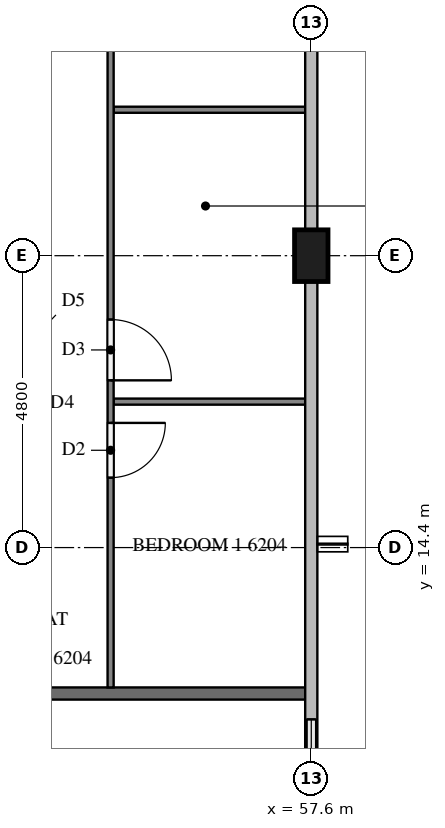
"""IFC4 building model, lengths in metres.
Left out: names, types, materials, properties, quantities, classifications, styles, units other than length and angle.
Written with IfcOpenShell. Run it as: python <this file> out.ifc"""

import sys

from ifc_helpers import new_model, si_unit, direction, frame, frame_2d, origin, origin_2d, place, context, subcontext, project, spatial, rectangle, extrude, element, fill, save


model = new_model("IFC4")
c1 = context("Model", 3, precision=1e-05, world=origin(), true_north=direction((0.0, 1.0)))
c2 = subcontext(c1, "Body", "Model", "MODEL_VIEW")
j1 = project(units=[si_unit("LENGTHUNIT", "METRE"), si_unit("PLANEANGLEUNIT", "RADIAN")], contexts=[c1])
p1 = place(None, origin())
s1 = spatial("IfcSite", under=j1, at=p1, CompositionType="ELEMENT")
p2 = place(p1, origin())
s2 = spatial("IfcBuilding", under=s1, at=p2, CompositionType="ELEMENT")
p3 = place(p2, frame((0.0, 0.0, 238.7)))
s3 = spatial("IfcBuildingStorey", under=s2, at=p3, CompositionType="ELEMENT", Elevation=238.7)
p4 = place(p3, frame((57.6, 19.2, 0.0), z_axis=(0.0, 0.0, 1.0), x_axis=(0.0, 1.0, 0.0)))
e1 = element("IfcColumn", 1, at=p4, inside=s3, PredefinedType="COLUMN", context=c2, shape_type="SweptSolid", body=[
    extrude(rectangle(XDim=0.85, YDim=0.55, at=origin_2d()), origin(), (0.0, 0.0, 1.0), 3.2),
])
p5 = place(p3, frame((57.6, 9.95, 0.0), z_axis=(0.0, 0.0, 1.0), x_axis=(0.0, 1.0, 0.0)))
e2 = element("IfcWall", 2, at=p5, inside=s3, PredefinedType="SOLIDWALL", context=c2, shape_type="SweptSolid", body=[
    extrude(rectangle(XDim=2.05, YDim=0.15, at=frame_2d((1.025, 0.0))), origin(), (0.0, 0.0, 1.0), 3.2),
])
p6 = place(p5, frame((0.425, 0.0, 0.9)))
e3 = element("IfcOpeningElement", 3, at=p6, cuts=e2, PredefinedType="OPENING", context=c2, shape_type="SweptSolid", body=[
    extrude(rectangle(XDim=1.2, YDim=1.4, at=frame_2d((0.6, 0.7))), frame((0.0, 0.085, 0.0), z_axis=(0.0, -1.0, 0.0), x_axis=(1.0, 0.0, 0.0)), (0.0, 0.0, 1.0), 0.17),
])
p7 = place(p3, frame((50.5, 12.0, 0.0), z_axis=(0.0, 0.0, 1.0), x_axis=(1.0, 0.0, 0.0)))
e4 = element("IfcWall", 4, at=p7, inside=s3, PredefinedType="PARTITIONING", context=c2, shape_type="SweptSolid", body=[
    extrude(rectangle(XDim=7.0, YDim=0.2, at=frame_2d((3.5, 0.0))), origin(), (0.0, 0.0, 1.0), 3.2),
])
for number, where, z_axis, x_axis in (
    (5, (54.35, 16.8, 0.0), (0.0, 0.0, 1.0), (1.0, 0.0, 0.0)),
    (6, (54.35, 21.6, 0.0), (0.0, 0.0, 1.0), (1.0, 0.0, 0.0)),
):
    element("IfcWall", number, at=place(p3, frame(where, z_axis=z_axis, x_axis=x_axis)), inside=s3, PredefinedType="PARTITIONING", context=c2, shape_type="SweptSolid", body=[
        extrude(rectangle(XDim=3.15, YDim=0.1, at=frame_2d((1.575, 0.0))), origin(), (0.0, 0.0, 1.0), 3.2),
    ])
p8 = place(p3, frame((54.3, 31.1, 0.0), z_axis=(0.0, 0.0, 1.0), x_axis=(0.0, -1.0, 0.0)))
e7 = element("IfcWall", 7, at=p8, inside=s3, PredefinedType="PARTITIONING", context=c2, shape_type="SweptSolid", body=[
    extrude(rectangle(XDim=19.0, YDim=0.1, at=frame_2d((9.5, 0.0))), origin(), (0.0, 0.0, 1.0), 3.2),
])
p9 = place(p8, frame((14.65, 0.0, 0.0)))
e8 = element("IfcOpeningElement", 8, at=p9, cuts=e7, PredefinedType="OPENING", context=c2, shape_type="SweptSolid", body=[
    extrude(rectangle(XDim=0.9, YDim=2.1, at=frame_2d((0.45, 1.05))), frame((0.0, 0.06, 0.0), z_axis=(0.0, -1.0, 0.0), x_axis=(1.0, 0.0, 0.0)), (0.0, 0.0, 1.0), 0.12),
])
p10 = place(p8, frame((12.95, 0.0, 0.0)))
e9 = element("IfcOpeningElement", 9, at=p10, cuts=e7, PredefinedType="OPENING", context=c2, shape_type="SweptSolid", body=[
    extrude(rectangle(XDim=1.0, YDim=2.1, at=frame_2d((0.5, 1.05))), frame((0.0, 0.06, 0.0), z_axis=(0.0, -1.0, 0.0), x_axis=(1.0, 0.0, 0.0)), (0.0, 0.0, 1.0), 0.12),
])
p11 = place(p8, frame((5.05, 0.0, 0.0)))
e10 = element("IfcOpeningElement", 10, at=p11, cuts=e7, PredefinedType="OPENING", context=c2, shape_type="SweptSolid", body=[
    extrude(rectangle(XDim=0.9, YDim=2.1, at=frame_2d((0.45, 1.05))), frame((0.0, 0.06, 0.0), z_axis=(0.0, -1.0, 0.0), x_axis=(1.0, 0.0, 0.0)), (0.0, 0.0, 1.0), 0.12),
])
p12 = place(p8, frame((3.45, 0.0, 0.0)))
e11 = element("IfcOpeningElement", 11, at=p12, cuts=e7, PredefinedType="OPENING", context=c2, shape_type="SweptSolid", body=[
    extrude(rectangle(XDim=0.9, YDim=2.1, at=frame_2d((0.45, 1.05))), frame((0.0, 0.06, 0.0), z_axis=(0.0, -1.0, 0.0), x_axis=(1.0, 0.0, 0.0)), (0.0, 0.0, 1.0), 0.12),
])
p13 = place(p6, origin())
e12 = element("IfcWindow", 12, at=p13, inside=s3, PartitioningType="SINGLE_PANEL", PredefinedType="WINDOW", context=c2, shape_type="SweptSolid", body=[
    extrude(rectangle(XDim=1.2, YDim=1.4, at=frame_2d((0.6, 0.7))), frame((0.0, 0.03, 0.0), z_axis=(0.0, -1.0, 0.0), x_axis=(1.0, 0.0, 0.0)), (0.0, 0.0, 1.0), 0.06),
])
fill(e3, e12)
p14 = place(p9, origin())
e13 = element("IfcDoor", 13, at=p14, inside=s3, OperationType="SINGLE_SWING_LEFT", PredefinedType="DOOR", context=c2, shape_type="SweptSolid", body=[
    extrude(rectangle(XDim=0.9, YDim=2.1, at=frame_2d((0.45, 1.05))), frame((0.0, 0.025, 0.0), z_axis=(0.0, -1.0, 0.0), x_axis=(1.0, 0.0, 0.0)), (0.0, 0.0, 1.0), 0.05),
])
fill(e8, e13)
p15 = place(p10, origin())
e14 = element("IfcDoor", 14, at=p15, inside=s3, OperationType="SINGLE_SWING_RIGHT", PredefinedType="DOOR", context=c2, shape_type="SweptSolid", body=[
    extrude(rectangle(XDim=1.0, YDim=2.1, at=frame_2d((0.5, 1.05))), frame((0.0, 0.025, 0.0), z_axis=(0.0, -1.0, 0.0), x_axis=(1.0, 0.0, 0.0)), (0.0, 0.0, 1.0), 0.05),
])
fill(e9, e14)
save(model, sys.argv[1])
